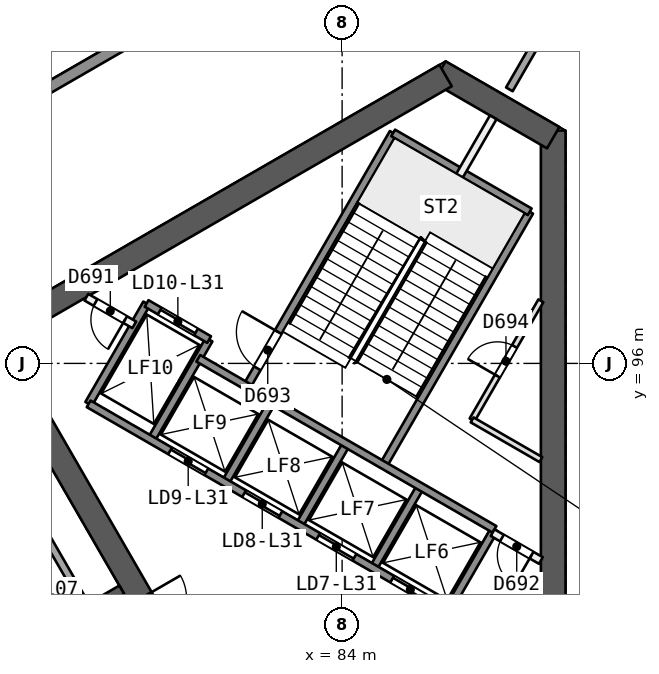
"""IFC4 building model, lengths in metres.
Left out: names, types, materials, properties, quantities, classifications, styles, units other than length and angle.
Written with IfcOpenShell. Run it as: python <this file> out.ifc"""

import sys

from ifc_helpers import new_model, si_unit, direction, frame, frame_2d, origin, place, context, subcontext, project, spatial, rectangle, extrude, element, fill, save


model = new_model("IFC4")
c1 = context("Model", 3, precision=1e-05, world=origin(), true_north=direction((0.0, 1.0)))
c2 = subcontext(c1, "Body", "Model", "MODEL_VIEW")
j1 = project(units=[si_unit("LENGTHUNIT", "METRE"), si_unit("PLANEANGLEUNIT", "RADIAN")], contexts=[c1])
p1 = place(None, origin())
s1 = spatial("IfcSite", under=j1, at=p1, CompositionType="ELEMENT")
p2 = place(p1, origin())
s2 = spatial("IfcBuilding", under=s1, at=p2, CompositionType="ELEMENT")
p3 = place(p2, frame((0.0, 0.0, 129.0)))
s3 = spatial("IfcBuildingStorey", under=s2, at=p3, CompositionType="ELEMENT", Elevation=129.0)
p4 = place(p3, frame((89.555, 88.119, 0.0), z_axis=(0.0, 0.0, 1.0), x_axis=(0.0, 1.0, 0.0)))
e1 = element("IfcWall", 1, at=p4, inside=s3, PredefinedType="SHEAR", context=c2, shape_type="SweptSolid", body=[
    extrude(rectangle(XDim=14.009, YDim=0.65, at=frame_2d((7.004, 0.0))), origin(), (0.0, 0.0, 1.0), 3.7),
])
p5 = place(p3, frame((89.555, 101.94, 0.0), z_axis=(0.0, 0.0, 1.0), x_axis=(-0.866031550877, 0.499989352773, 0.0)))
e2 = element("IfcWall", 2, at=p5, inside=s3, PredefinedType="SHEAR", context=c2, shape_type="SweptSolid", body=[
    extrude(rectangle(XDim=3.458, YDim=0.65, at=frame_2d((1.729, 0.0))), origin(), (0.0, 0.0, 1.0), 3.7),
])
p6 = place(p3, frame((86.723, 103.575, 0.0), z_axis=(0.0, 0.0, 1.0), x_axis=(-0.866031824457, -0.499988878904, 0.0)))
e3 = element("IfcWall", 3, at=p6, inside=s3, PredefinedType="SHEAR", context=c2, shape_type="SweptSolid", body=[
    extrude(rectangle(XDim=14.146, YDim=0.65, at=frame_2d((7.073, 0.0))), origin(), (0.0, 0.0, 1.0), 3.7),
])
p7 = place(p3, frame((74.754, 96.665, 0.0), z_axis=(0.0, 0.0, 1.0), x_axis=(0.500011799426, -0.866018591275, 0.0)))
e4 = element("IfcWall", 4, at=p7, inside=s3, PredefinedType="SHEAR", context=c2, shape_type="SweptSolid", body=[
    extrude(rectangle(XDim=10.055, YDim=0.65, at=frame_2d((5.027, 0.0))), origin(), (0.0, 0.0, 1.0), 3.7),
])
p8 = place(p7, frame((7.905, 0.0, 0.0)))
e5 = element("IfcOpeningElement", 5, at=p8, cuts=e4, PredefinedType="OPENING", context=c2, shape_type="SweptSolid", body=[
    extrude(rectangle(XDim=1.2, YDim=2.1, at=frame_2d((0.6, 1.05))), frame((0.0, 0.335, 0.0), z_axis=(0.0, -1.0, 0.0), x_axis=(1.0, 0.0, 0.0)), (0.0, 0.0, 1.0), 0.671),
])
p9 = place(p3, frame((78.2, 90.046, 0.0), z_axis=(0.0, 0.0, 1.0), x_axis=(-0.866026492143, -0.499998114903, 0.0)))
e6 = element("IfcWall", 6, at=p9, inside=s3, PredefinedType="SHEAR", context=c2, shape_type="SweptSolid", body=[
    extrude(rectangle(XDim=15.588, YDim=0.25, at=frame_2d((7.794, 0.0))), origin(), (0.0, 0.0, 1.0), 3.25),
])
p10 = place(p9, frame((1.527, 0.0, 0.0)))
e7 = element("IfcOpeningElement", 7, at=p10, cuts=e6, PredefinedType="OPENING", context=c2, shape_type="SweptSolid", body=[
    extrude(rectangle(XDim=1.0, YDim=2.1, at=frame_2d((0.5, 1.05))), frame((0.0, 0.135, 0.0), z_axis=(0.0, -1.0, 0.0), x_axis=(1.0, 0.0, 0.0)), (0.0, 0.0, 1.0), 0.271),
])
p11 = place(p9, frame((8.694, 0.0, 0.0)))
e8 = element("IfcOpeningElement", 8, at=p11, cuts=e6, PredefinedType="OPENING", context=c2, shape_type="SweptSolid", body=[
    extrude(rectangle(XDim=1.1, YDim=2.1, at=frame_2d((0.55, 1.05))), frame((0.0, 0.135, 0.0), z_axis=(0.0, -1.0, 0.0), x_axis=(1.0, 0.0, 0.0)), (0.0, 0.0, 1.0), 0.271),
])
p12 = place(p9, frame((13.062, 0.0, 0.0)))
e9 = element("IfcOpeningElement", 9, at=p12, cuts=e6, PredefinedType="OPENING", context=c2, shape_type="SweptSolid", body=[
    extrude(rectangle(XDim=1.0, YDim=2.1, at=frame_2d((0.5, 1.05))), frame((0.0, 0.135, 0.0), z_axis=(0.0, -1.0, 0.0), x_axis=(1.0, 0.0, 0.0)), (0.0, 0.0, 1.0), 0.271),
])
p13 = place(p3, frame((91.942, 109.345, 0.0), z_axis=(0.0, 0.0, 1.0), x_axis=(-0.499980071345, -0.866036909293, 0.0)))
e10 = element("IfcWall", 10, at=p13, inside=s3, PredefinedType="PARTITIONING", context=c2, shape_type="SweptSolid", body=[
    extrude(rectangle(XDim=7.082, YDim=0.2, at=frame_2d((3.541, 0.0))), origin(), (0.0, 0.0, 1.0), 3.25),
])
p14 = place(p3, frame((72.811, 97.327, 0.0), z_axis=(0.0, 0.0, 1.0), x_axis=(0.5000018851, -0.866024315419, 0.0)))
e11 = element("IfcWall", 11, at=p14, inside=s3, PredefinedType="PARTITIONING", context=c2, shape_type="SweptSolid", body=[
    extrude(rectangle(XDim=9.0, YDim=0.2, at=frame_2d((4.5, 0.0))), origin(), (0.0, 0.0, 1.0), 3.25),
])
p15 = place(p3, frame((40.967, 82.869, 0.0), z_axis=(0.0, 0.0, 1.0), x_axis=(0.86602616217, 0.499998686435, 0.0)))
e12 = element("IfcWall", 12, at=p15, inside=s3, PredefinedType="SOLIDWALL", context=c2, shape_type="SweptSolid", body=[
    extrude(rectangle(XDim=56.079, YDim=0.3, at=frame_2d((28.04, 0.0))), origin(), (0.0, 0.0, 1.0), 3.25),
])
p16 = place(p15, frame((26.839, 0.0, 0.0)))
e13 = element("IfcOpeningElement", 13, at=p16, cuts=e12, PredefinedType="OPENING", context=c2, shape_type="SweptSolid", body=[
    extrude(rectangle(XDim=2.4, YDim=2.4, at=frame_2d((1.2, 1.2))), frame((0.0, 0.161, 0.0), z_axis=(0.0, -1.0, 0.0), x_axis=(1.0, 0.0, 0.0)), (0.0, 0.0, 1.0), 0.321),
])
p17 = place(p15, frame((32.607, 0.0, 0.0)))
e14 = element("IfcOpeningElement", 14, at=p17, cuts=e12, PredefinedType="OPENING", context=c2, shape_type="SweptSolid", body=[
    extrude(rectangle(XDim=2.4, YDim=2.4, at=frame_2d((1.2, 1.2))), frame((0.0, 0.161, 0.0), z_axis=(0.0, -1.0, 0.0), x_axis=(1.0, 0.0, 0.0)), (0.0, 0.0, 1.0), 0.321),
])
p18 = place(p15, frame((43.547, 0.0, 0.0)))
e15 = element("IfcOpeningElement", 15, at=p18, cuts=e12, PredefinedType="OPENING", context=c2, shape_type="SweptSolid", body=[
    extrude(rectangle(XDim=2.4, YDim=2.4, at=frame_2d((1.2, 1.2))), frame((0.0, 0.161, 0.0), z_axis=(0.0, -1.0, 0.0), x_axis=(1.0, 0.0, 0.0)), (0.0, 0.0, 1.0), 0.321),
])
p19 = place(p15, frame((21.072, 0.0, 0.0)))
e16 = element("IfcOpeningElement", 16, at=p19, cuts=e12, PredefinedType="OPENING", context=c2, shape_type="SweptSolid", body=[
    extrude(rectangle(XDim=2.4, YDim=2.4, at=frame_2d((1.2, 1.2))), frame((0.0, 0.161, 0.0), z_axis=(0.0, -1.0, 0.0), x_axis=(1.0, 0.0, 0.0)), (0.0, 0.0, 1.0), 0.321),
])
p20 = place(p15, frame((10.136, 0.0, 0.0)))
e17 = element("IfcOpeningElement", 17, at=p20, cuts=e12, PredefinedType="OPENING", context=c2, shape_type="SweptSolid", body=[
    extrude(rectangle(XDim=2.4, YDim=2.4, at=frame_2d((1.2, 1.2))), frame((0.0, 0.161, 0.0), z_axis=(0.0, -1.0, 0.0), x_axis=(1.0, 0.0, 0.0)), (0.0, 0.0, 1.0), 0.321),
])
p21 = place(p3, frame((86.77, 89.486, 0.0), z_axis=(0.0, 0.0, 1.0), x_axis=(0.499961042966, 0.86604789447, 0.0)))
e18 = element("IfcWall", 18, at=p21, inside=s3, PredefinedType="SOLIDWALL", context=c2, shape_type="SweptSolid", body=[
    extrude(rectangle(XDim=2.48, YDim=0.2, at=frame_2d((1.24, 0.0))), origin(), (0.0, 0.0, 1.0), 3.25),
])
p22 = place(p3, frame((87.421, 94.514, 0.0), z_axis=(0.0, 0.0, 1.0), x_axis=(0.499993116331, 0.866029378036, 0.0)))
e19 = element("IfcWall", 19, at=p22, inside=s3, PredefinedType="PARTITIONING", context=c2, shape_type="SweptSolid", body=[
    extrude(rectangle(XDim=3.618, YDim=0.15, at=frame_2d((1.809, 0.0))), origin(), (0.0, 0.0, 1.0), 3.25),
])
p23 = place(p22, frame((1.332, 0.0, 0.0)))
e20 = element("IfcOpeningElement", 20, at=p23, cuts=e19, PredefinedType="OPENING", context=c2, shape_type="SweptSolid", body=[
    extrude(rectangle(XDim=0.9, YDim=2.1, at=frame_2d((0.45, 1.05))), frame((0.0, 0.085, 0.0), z_axis=(0.0, -1.0, 0.0), x_axis=(1.0, 0.0, 0.0)), (0.0, 0.0, 1.0), 0.171),
])
p24 = place(p3, frame((84.821, 90.611, 0.0), z_axis=(0.0, 0.0, 1.0), x_axis=(0.499961042966, 0.86604789447, 0.0)))
e21 = element("IfcWall", 21, at=p24, inside=s3, PredefinedType="SOLIDWALL", context=c2, shape_type="SweptSolid", body=[
    extrude(rectangle(XDim=2.48, YDim=0.2, at=frame_2d((1.24, 0.0))), origin(), (0.0, 0.0, 1.0), 3.25),
])
p25 = place(p3, frame((85.087, 93.321, 0.0), z_axis=(0.0, 0.0, 1.0), x_axis=(0.500019787375, 0.866013979237, 0.0)))
e22 = element("IfcWall", 22, at=p25, inside=s3, PredefinedType="SOLIDWALL", context=c2, shape_type="SweptSolid", body=[
    extrude(rectangle(XDim=7.7, YDim=0.2, at=frame_2d((3.85, 0.0))), origin(), (0.0, 0.0, 1.0), 3.25),
])
p26 = place(p3, frame((82.873, 91.736, 0.0), z_axis=(0.0, 0.0, 1.0), x_axis=(0.499961042966, 0.86604789447, 0.0)))
e23 = element("IfcWall", 23, at=p26, inside=s3, PredefinedType="SOLIDWALL", context=c2, shape_type="SweptSolid", body=[
    extrude(rectangle(XDim=2.48, YDim=0.2, at=frame_2d((1.24, 0.0))), origin(), (0.0, 0.0, 1.0), 3.25),
])
p27 = place(p3, frame((87.09, 100.94, 0.0), z_axis=(0.0, 0.0, 1.0), x_axis=(0.499944938281, 0.866057191349, 0.0)))
e24 = element("IfcWall", 24, at=p27, inside=s3, PredefinedType="PARTITIONING", context=c2, shape_type="SweptSolid", body=[
    extrude(rectangle(XDim=1.773, YDim=0.2, at=frame_2d((0.887, 0.0))), origin(), (0.0, 0.0, 1.0), 3.25),
])
p28 = place(p3, frame((80.924, 92.861, 0.0), z_axis=(0.0, 0.0, 1.0), x_axis=(0.499961042966, 0.86604789447, 0.0)))
e25 = element("IfcWall", 25, at=p28, inside=s3, PredefinedType="SOLIDWALL", context=c2, shape_type="SweptSolid", body=[
    extrude(rectangle(XDim=2.48, YDim=0.2, at=frame_2d((1.24, 0.0))), origin(), (0.0, 0.0, 1.0), 3.25),
])
p29 = place(p3, frame((81.493, 95.396, 0.0), z_axis=(0.0, 0.0, 1.0), x_axis=(0.500006057782, 0.866021906294, 0.0)))
e26 = element("IfcWall", 26, at=p29, inside=s3, PredefinedType="SOLIDWALL", context=c2, shape_type="SweptSolid", body=[
    extrude(rectangle(XDim=7.7, YDim=0.2, at=frame_2d((3.85, 0.0))), origin(), (0.0, 0.0, 1.0), 3.25),
])
p30 = place(p29, frame((0.55, 0.0, 0.0)))
e27 = element("IfcOpeningElement", 27, at=p30, cuts=e26, PredefinedType="OPENING", context=c2, shape_type="SweptSolid", body=[
    extrude(rectangle(XDim=1.1, YDim=2.1, at=frame_2d((0.55, 1.05))), frame((0.0, 0.11, 0.0), z_axis=(0.0, -1.0, 0.0), x_axis=(1.0, 0.0, 0.0)), (0.0, 0.0, 1.0), 0.221),
])
for number, where, z_axis, x_axis in (
    (28, (78.976, 93.986, 0.0), (0.0, 0.0, 1.0), (0.5, 0.866, 0.0)),
    (29, (77.33, 94.936, 0.0), (0.0, 0.0, 1.0), (0.5, 0.866, 0.0)),
):
    element("IfcWall", number, at=place(p3, frame(where, z_axis=z_axis, x_axis=x_axis)), inside=s3, PredefinedType="SOLIDWALL", context=c2, shape_type="SweptSolid", body=[
        extrude(rectangle(XDim=3.05, YDim=0.2, at=frame_2d((1.525, 0.0))), origin(), (0.0, 0.0, 1.0), 3.25),
    ])
p31 = place(p3, frame((86.77, 89.486, 0.0), z_axis=(0.0, 0.0, 1.0), x_axis=(-0.86601811187, 0.500012629753, 0.0)))
e30 = element("IfcWall", 30, at=p31, inside=s3, PredefinedType="SOLIDWALL", context=c2, shape_type="SweptSolid", body=[
    extrude(rectangle(XDim=10.9, YDim=0.2, at=frame_2d((5.45, 0.0))), origin(), (0.0, 0.0, 1.0), 3.25),
])
p32 = place(p31, frame((0.575, 0.0, 0.0)))
e31 = element("IfcOpeningElement", 31, at=p32, cuts=e30, PredefinedType="OPENING", context=c2, shape_type="SweptSolid", body=[
    extrude(rectangle(XDim=1.1, YDim=2.1, at=frame_2d((0.55, 1.05))), frame((0.0, 0.11, 0.0), z_axis=(0.0, -1.0, 0.0), x_axis=(1.0, 0.0, 0.0)), (0.0, 0.0, 1.0), 0.221),
])
p33 = place(p31, frame((2.825, 0.0, 0.0)))
e32 = element("IfcOpeningElement", 32, at=p33, cuts=e30, PredefinedType="OPENING", context=c2, shape_type="SweptSolid", body=[
    extrude(rectangle(XDim=1.1, YDim=2.1, at=frame_2d((0.55, 1.05))), frame((0.0, 0.11, 0.0), z_axis=(0.0, -1.0, 0.0), x_axis=(1.0, 0.0, 0.0)), (0.0, 0.0, 1.0), 0.221),
])
p34 = place(p31, frame((5.075, 0.0, 0.0)))
e33 = element("IfcOpeningElement", 33, at=p34, cuts=e30, PredefinedType="OPENING", context=c2, shape_type="SweptSolid", body=[
    extrude(rectangle(XDim=1.1, YDim=2.1, at=frame_2d((0.55, 1.05))), frame((0.0, 0.11, 0.0), z_axis=(0.0, -1.0, 0.0), x_axis=(1.0, 0.0, 0.0)), (0.0, 0.0, 1.0), 0.221),
])
p35 = place(p31, frame((7.325, 0.0, 0.0)))
e34 = element("IfcOpeningElement", 34, at=p35, cuts=e30, PredefinedType="OPENING", context=c2, shape_type="SweptSolid", body=[
    extrude(rectangle(XDim=1.1, YDim=2.1, at=frame_2d((0.55, 1.05))), frame((0.0, 0.11, 0.0), z_axis=(0.0, -1.0, 0.0), x_axis=(1.0, 0.0, 0.0)), (0.0, 0.0, 1.0), 0.221),
])
p36 = place(p3, frame((89.23, 90.814, 0.0), z_axis=(0.0, 0.0, 1.0), x_axis=(-0.866022048785, 0.500005810984, 0.0)))
e35 = element("IfcWall", 35, at=p36, inside=s3, PredefinedType="PARTITIONING", context=c2, shape_type="SweptSolid", body=[
    extrude(rectangle(XDim=1.467, YDim=0.2, at=frame_2d((0.733, 0.0))), origin(), (0.0, 0.0, 1.0), 3.25),
])
p37 = place(p36, frame((0.283, 0.0, 0.0)))
e36 = element("IfcOpeningElement", 36, at=p37, cuts=e35, PredefinedType="OPENING", context=c2, shape_type="SweptSolid", body=[
    extrude(rectangle(XDim=0.9, YDim=2.1, at=frame_2d((0.45, 1.05))), frame((0.0, 0.11, 0.0), z_axis=(0.0, -1.0, 0.0), x_axis=(1.0, 0.0, 0.0)), (0.0, 0.0, 1.0), 0.221),
])
p38 = place(p3, frame((78.53, 97.014, 0.0), z_axis=(0.0, 0.0, 1.0), x_axis=(-0.866045896294, 0.499964504253, 0.0)))
e37 = element("IfcWall", 37, at=p38, inside=s3, PredefinedType="PARTITIONING", context=c2, shape_type="SweptSolid", body=[
    extrude(rectangle(XDim=1.455, YDim=0.2, at=frame_2d((0.728, 0.0))), origin(), (0.0, 0.0, 1.0), 3.25),
])
p39 = place(p38, frame((0.278, 0.0, 0.0)))
e38 = element("IfcOpeningElement", 38, at=p39, cuts=e37, PredefinedType="OPENING", context=c2, shape_type="SweptSolid", body=[
    extrude(rectangle(XDim=0.9, YDim=2.1, at=frame_2d((0.45, 1.05))), frame((0.0, 0.11, 0.0), z_axis=(0.0, -1.0, 0.0), x_axis=(1.0, 0.0, 0.0)), (0.0, 0.0, 1.0), 0.221),
])
p40 = place(p3, frame((88.01, 91.634, 0.0), z_axis=(0.0, 0.0, 1.0), x_axis=(-0.866024315419, 0.5000018851, 0.0)))
e39 = element("IfcWall", 39, at=p40, inside=s3, PredefinedType="SOLIDWALL", context=c2, shape_type="SweptSolid", body=[
    extrude(rectangle(XDim=9.0, YDim=0.2, at=frame_2d((4.5, 0.0))), origin(), (0.0, 0.0, 1.0), 3.25),
])
p41 = place(p3, frame((80.5, 96.627, 0.0), z_axis=(0.0, 0.0, 1.0), x_axis=(-0.86601224135, 0.500022797313, 0.0)))
e40 = element("IfcWall", 40, at=p41, inside=s3, PredefinedType="SOLIDWALL", context=c2, shape_type="SweptSolid", body=[
    extrude(rectangle(XDim=1.9, YDim=0.2, at=frame_2d((0.95, 0.0))), origin(), (0.0, 0.0, 1.0), 3.25),
])
p42 = place(p41, frame((0.4, 0.0, 0.0)))
e41 = element("IfcOpeningElement", 41, at=p42, cuts=e40, PredefinedType="OPENING", context=c2, shape_type="SweptSolid", body=[
    extrude(rectangle(XDim=1.1, YDim=2.1, at=frame_2d((0.55, 1.05))), frame((0.0, 0.11, 0.0), z_axis=(0.0, -1.0, 0.0), x_axis=(1.0, 0.0, 0.0)), (0.0, 0.0, 1.0), 0.221),
])
p43 = place(p3, frame((89.23, 93.469, 0.0), z_axis=(0.0, 0.0, 1.0), x_axis=(-0.866004557827, 0.500036104519, 0.0)))
e42 = element("IfcWall", 42, at=p43, inside=s3, PredefinedType="PARTITIONING", context=c2, shape_type="SweptSolid", body=[
    extrude(rectangle(XDim=2.089, YDim=0.15, at=frame_2d((1.044, 0.0))), origin(), (0.0, 0.0, 1.0), 3.25),
])
p44 = place(p3, frame((88.937, 99.99, 0.0), z_axis=(0.0, 0.0, 1.0), x_axis=(-0.866004344652, 0.500036473714, 0.0)))
e43 = element("IfcWall", 43, at=p44, inside=s3, PredefinedType="SOLIDWALL", context=c2, shape_type="SweptSolid", body=[
    extrude(rectangle(XDim=4.15, YDim=0.2, at=frame_2d((2.075, 0.0))), origin(), (0.0, 0.0, 1.0), 3.25),
])
p45 = place(p32, origin())
e44 = element("IfcDoor", 44, at=p45, inside=s3, OperationType="SLIDING_TO_RIGHT", PredefinedType="NOTDEFINED", context=c2, shape_type="SweptSolid", body=[
    extrude(rectangle(XDim=1.1, YDim=2.1, at=frame_2d((0.55, 1.05))), frame((0.0, 0.025, 0.0), z_axis=(0.0, -1.0, 0.0), x_axis=(1.0, 0.0, 0.0)), (0.0, 0.0, 1.0), 0.05),
])
fill(e31, e44)
p46 = place(p33, origin())
e45 = element("IfcDoor", 45, at=p46, inside=s3, OperationType="SLIDING_TO_LEFT", PredefinedType="NOTDEFINED", context=c2, shape_type="SweptSolid", body=[
    extrude(rectangle(XDim=1.1, YDim=2.1, at=frame_2d((0.55, 1.05))), frame((0.0, 0.025, 0.0), z_axis=(0.0, -1.0, 0.0), x_axis=(1.0, 0.0, 0.0)), (0.0, 0.0, 1.0), 0.05),
])
fill(e32, e45)
p47 = place(p34, origin())
e46 = element("IfcDoor", 46, at=p47, inside=s3, OperationType="SLIDING_TO_RIGHT", PredefinedType="NOTDEFINED", context=c2, shape_type="SweptSolid", body=[
    extrude(rectangle(XDim=1.1, YDim=2.1, at=frame_2d((0.55, 1.05))), frame((0.0, 0.025, 0.0), z_axis=(0.0, -1.0, 0.0), x_axis=(1.0, 0.0, 0.0)), (0.0, 0.0, 1.0), 0.05),
])
fill(e33, e46)
p48 = place(p35, origin())
e47 = element("IfcDoor", 47, at=p48, inside=s3, OperationType="SLIDING_TO_LEFT", PredefinedType="NOTDEFINED", context=c2, shape_type="SweptSolid", body=[
    extrude(rectangle(XDim=1.1, YDim=2.1, at=frame_2d((0.55, 1.05))), frame((0.0, 0.025, 0.0), z_axis=(0.0, -1.0, 0.0), x_axis=(1.0, 0.0, 0.0)), (0.0, 0.0, 1.0), 0.05),
])
fill(e34, e47)
p49 = place(p42, origin())
e48 = element("IfcDoor", 48, at=p49, inside=s3, OperationType="SLIDING_TO_RIGHT", PredefinedType="NOTDEFINED", context=c2, shape_type="SweptSolid", body=[
    extrude(rectangle(XDim=1.1, YDim=2.1, at=frame_2d((0.55, 1.05))), frame((0.0, 0.025, 0.0), z_axis=(0.0, -1.0, 0.0), x_axis=(1.0, 0.0, 0.0)), (0.0, 0.0, 1.0), 0.05),
])
fill(e41, e48)
p50 = place(p39, origin())
e49 = element("IfcDoor", 49, at=p50, inside=s3, OperationType="SINGLE_SWING_LEFT", PredefinedType="NOTDEFINED", context=c2, shape_type="SweptSolid", body=[
    extrude(rectangle(XDim=0.9, YDim=2.1, at=frame_2d((0.45, 1.05))), frame((0.0, 0.025, 0.0), z_axis=(0.0, -1.0, 0.0), x_axis=(1.0, 0.0, 0.0)), (0.0, 0.0, 1.0), 0.05),
])
fill(e38, e49)
p51 = place(p37, origin())
e50 = element("IfcDoor", 50, at=p51, inside=s3, OperationType="SINGLE_SWING_LEFT", PredefinedType="NOTDEFINED", context=c2, shape_type="SweptSolid", body=[
    extrude(rectangle(XDim=0.9, YDim=2.1, at=frame_2d((0.45, 1.05))), frame((0.0, 0.025, 0.0), z_axis=(0.0, -1.0, 0.0), x_axis=(1.0, 0.0, 0.0)), (0.0, 0.0, 1.0), 0.05),
])
fill(e36, e50)
p52 = place(p30, origin())
e51 = element("IfcDoor", 51, at=p52, inside=s3, OperationType="SINGLE_SWING_RIGHT", PredefinedType="NOTDEFINED", context=c2, shape_type="SweptSolid", body=[
    extrude(rectangle(XDim=1.1, YDim=2.1, at=frame_2d((0.55, 1.05))), frame((0.0, 0.025, 0.0), z_axis=(0.0, -1.0, 0.0), x_axis=(1.0, 0.0, 0.0)), (0.0, 0.0, 1.0), 0.05),
])
fill(e27, e51)
p53 = place(p23, origin())
e52 = element("IfcDoor", 52, at=p53, inside=s3, OperationType="SINGLE_SWING_LEFT", PredefinedType="NOTDEFINED", context=c2, shape_type="SweptSolid", body=[
    extrude(rectangle(XDim=0.9, YDim=2.1, at=frame_2d((0.45, 1.05))), frame((0.0, 0.025, 0.0), z_axis=(0.0, -1.0, 0.0), x_axis=(1.0, 0.0, 0.0)), (0.0, 0.0, 1.0), 0.05),
])
fill(e20, e52)
save(model, sys.argv[1])
